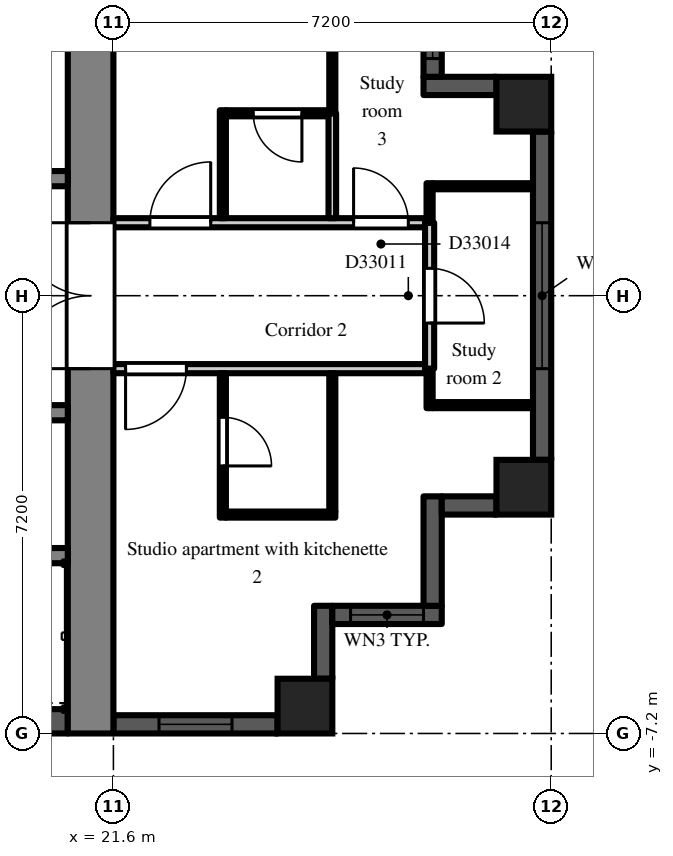
"""IFC4 building model, lengths in metres.
Left out: names, types, materials, properties, quantities, classifications, styles, units other than length and angle.
Written with IfcOpenShell. Run it as: python <this file> out.ifc"""

import sys

from ifc_helpers import new_model, si_unit, direction, frame, frame_2d, origin, origin_2d, place, context, subcontext, project, spatial, rectangle, extrude, element, fill, save


model = new_model("IFC4")
c1 = context("Model", 3, precision=1e-05, world=origin(), true_north=direction((0.0, 1.0)))
c2 = subcontext(c1, "Body", "Model", "MODEL_VIEW")
j1 = project(units=[si_unit("LENGTHUNIT", "METRE"), si_unit("PLANEANGLEUNIT", "RADIAN")], contexts=[c1])
p1 = place(None, origin())
s1 = spatial("IfcSite", under=j1, at=p1, CompositionType="ELEMENT")
p2 = place(p1, origin())
s2 = spatial("IfcBuilding", under=s1, at=p2, CompositionType="ELEMENT")
p3 = place(p2, frame((0.0, 0.0, 231.9)))
s3 = spatial("IfcBuildingStorey", under=s2, at=p3, CompositionType="ELEMENT", Elevation=231.9)
for number, where, z_axis, x_axis in (
    (1, (24.75, -6.75, 0.0), (0.0, 0.0, 1.0), (1.0, 0.0, 0.0)),
    (2, (28.35, -3.15, 0.0), (0.0, 0.0, 1.0), (1.0, 0.0, 0.0)),
    (3, (28.35, 3.15, 0.0), (0.0, 0.0, 1.0), (1.0, 0.0, 0.0)),
):
    element("IfcColumn", number, at=place(p3, frame(where, z_axis=z_axis, x_axis=x_axis)), inside=s3, PredefinedType="COLUMN", context=c2, shape_type="SweptSolid", body=[
        extrude(rectangle(XDim=0.9, YDim=0.9, at=origin_2d()), origin(), (0.0, 0.0, 1.0), 3.0),
    ])
p4 = place(p3, frame((21.6, -7.05, 0.0), z_axis=(0.0, 0.0, 1.0), x_axis=(1.0, 0.0, 0.0)))
e4 = element("IfcWall", 4, at=p4, inside=s3, PredefinedType="SOLIDWALL", context=c2, shape_type="SweptSolid", body=[
    extrude(rectangle(XDim=2.7, YDim=0.3, at=frame_2d((1.35, 0.0))), origin(), (0.0, 0.0, 1.0), 2.3),
])
p5 = place(p4, frame((0.75, 0.0, 0.2)))
e5 = element("IfcOpeningElement", 5, at=p5, cuts=e4, PredefinedType="OPENING", context=c2, shape_type="SweptSolid", body=[
    extrude(rectangle(XDim=1.2, YDim=1.85, at=frame_2d((0.6, 0.925))), frame((0.0, 0.16, 0.0), z_axis=(0.0, -1.0, 0.0), x_axis=(1.0, 0.0, 0.0)), (0.0, 0.0, 1.0), 0.32),
])
p6 = place(p3, frame((25.05, -6.3, 0.0), z_axis=(0.0, 0.0, 1.0), x_axis=(0.0, 1.0, 0.0)))
e6 = element("IfcWall", 6, at=p6, inside=s3, PredefinedType="SOLIDWALL", context=c2, shape_type="SweptSolid", body=[
    extrude(rectangle(XDim=1.2, YDim=0.3, at=frame_2d((0.6, 0.0))), origin(), (0.0, 0.0, 1.0), 2.6),
])
p7 = place(p3, frame((25.2, -5.25, 0.0), z_axis=(0.0, 0.0, 1.0), x_axis=(1.0, 0.0, 0.0)))
e7 = element("IfcWall", 7, at=p7, inside=s3, PredefinedType="SOLIDWALL", context=c2, shape_type="SweptSolid", body=[
    extrude(rectangle(XDim=1.8, YDim=0.3, at=frame_2d((0.9, 0.0))), origin(), (0.0, 0.0, 1.0), 2.6),
])
p8 = place(p7, frame((0.3, 0.0, 0.2)))
e8 = element("IfcOpeningElement", 8, at=p8, cuts=e7, PredefinedType="OPENING", context=c2, shape_type="SweptSolid", body=[
    extrude(rectangle(XDim=1.2, YDim=1.85, at=frame_2d((0.6, 0.925))), frame((0.0, 0.16, 0.0), z_axis=(0.0, -1.0, 0.0), x_axis=(1.0, 0.0, 0.0)), (0.0, 0.0, 1.0), 0.32),
])
p9 = place(p3, frame((26.85, -5.1, 0.0), z_axis=(0.0, 0.0, 1.0), x_axis=(0.0, 1.0, 0.0)))
e9 = element("IfcWall", 9, at=p9, inside=s3, PredefinedType="SOLIDWALL", context=c2, shape_type="SweptSolid", body=[
    extrude(rectangle(XDim=1.8, YDim=0.3, at=frame_2d((0.9, 0.0))), origin(), (0.0, 0.0, 1.0), 2.6),
])
p10 = place(p3, frame((27.0, -3.45, 0.0), z_axis=(0.0, 0.0, 1.0), x_axis=(1.0, 0.0, 0.0)))
e10 = element("IfcWall", 10, at=p10, inside=s3, PredefinedType="SOLIDWALL", context=c2, shape_type="SweptSolid", body=[
    extrude(rectangle(XDim=0.9, YDim=0.3, at=frame_2d((0.45, 0.0))), origin(), (0.0, 0.0, 1.0), 2.6),
])
p11 = place(p3, frame((28.65, -2.7, 0.0), z_axis=(0.0, 0.0, 1.0), x_axis=(0.0, 1.0, 0.0)))
e11 = element("IfcWall", 11, at=p11, inside=s3, PredefinedType="SOLIDWALL", context=c2, shape_type="SweptSolid", body=[
    extrude(rectangle(XDim=5.4, YDim=0.3, at=frame_2d((2.7, 0.0))), origin(), (0.0, 0.0, 1.0), 2.3),
])
p12 = place(p11, frame((1.5, 0.0, 0.2)))
e12 = element("IfcOpeningElement", 12, at=p12, cuts=e11, PredefinedType="OPENING", context=c2, shape_type="SweptSolid", body=[
    extrude(rectangle(XDim=2.4, YDim=1.85, at=frame_2d((1.2, 0.925))), frame((0.0, 0.16, 0.0), z_axis=(0.0, -1.0, 0.0), x_axis=(1.0, 0.0, 0.0)), (0.0, 0.0, 1.0), 0.32),
])
p13 = place(p3, frame((27.9, 3.45, 0.0), z_axis=(0.0, 0.0, 1.0), x_axis=(-1.0, 0.0, 0.0)))
e13 = element("IfcWall", 13, at=p13, inside=s3, PredefinedType="SOLIDWALL", context=c2, shape_type="SweptSolid", body=[
    extrude(rectangle(XDim=1.2, YDim=0.3, at=frame_2d((0.6, 0.0))), origin(), (0.0, 0.0, 1.0), 2.6),
])
p14 = place(p3, frame((26.85, 3.6, 0.0), z_axis=(0.0, 0.0, 1.0), x_axis=(0.0, 1.0, 0.0)))
e14 = element("IfcWall", 14, at=p14, inside=s3, PredefinedType="SOLIDWALL", context=c2, shape_type="SweptSolid", body=[
    extrude(rectangle(XDim=1.8, YDim=0.3, at=frame_2d((0.9, 0.0))), origin(), (0.0, 0.0, 1.0), 2.6),
])
p15 = place(p14, frame((0.3, 0.0, 0.2)))
e15 = element("IfcOpeningElement", 15, at=p15, cuts=e14, PredefinedType="OPENING", context=c2, shape_type="SweptSolid", body=[
    extrude(rectangle(XDim=1.2, YDim=1.85, at=frame_2d((0.6, 0.925))), frame((0.0, 0.16, 0.0), z_axis=(0.0, -1.0, 0.0), x_axis=(1.0, 0.0, 0.0)), (0.0, 0.0, 1.0), 0.32),
])
p16 = place(p3, frame((21.225, -7.2, 0.0), z_axis=(0.0, 0.0, 1.0), x_axis=(0.0, 1.0, 0.0)))
e16 = element("IfcWall", 16, at=p16, inside=s3, PredefinedType="SHEAR", context=c2, shape_type="SweptSolid", body=[
    extrude(rectangle(XDim=14.4, YDim=0.75, at=frame_2d((7.2, 0.0))), origin(), (0.0, 0.0, 1.0), 2.6),
])
p17 = place(p16, frame((6.0, 0.0, 0.0)))
e17 = element("IfcOpeningElement", 17, at=p17, cuts=e16, PredefinedType="OPENING", context=c2, shape_type="SweptSolid", body=[
    extrude(rectangle(XDim=2.4, YDim=2.2, at=frame_2d((1.2, 1.1))), frame((0.0, 0.385, 0.0), z_axis=(0.0, -1.0, 0.0), x_axis=(1.0, 0.0, 0.0)), (0.0, 0.0, 1.0), 0.77),
])
p18 = place(p3, frame((7.9, 1.925, 0.0), z_axis=(0.0, 0.0, 1.0), x_axis=(1.0, 0.0, 0.0)))
e18 = element("IfcWall", 18, at=p18, inside=s3, PredefinedType="SHEAR", context=c2, shape_type="SweptSolid", body=[
    extrude(rectangle(XDim=12.95, YDim=0.25, at=frame_2d((6.475, 0.0))), origin(), (0.0, 0.0, 1.0), 2.6),
])
p19 = place(p18, frame((4.825, 0.0, 0.0)))
e19 = element("IfcOpeningElement", 19, at=p19, cuts=e18, PredefinedType="OPENING", context=c2, shape_type="SweptSolid", body=[
    extrude(rectangle(XDim=1.1, YDim=2.1, at=frame_2d((0.55, 1.05))), frame((0.0, 0.135, 0.0), z_axis=(0.0, -1.0, 0.0), x_axis=(1.0, 0.0, 0.0)), (0.0, 0.0, 1.0), 0.27),
])
p20 = place(p18, frame((7.025, 0.0, 0.0)))
e20 = element("IfcOpeningElement", 20, at=p20, cuts=e18, PredefinedType="OPENING", context=c2, shape_type="SweptSolid", body=[
    extrude(rectangle(XDim=1.1, YDim=2.1, at=frame_2d((0.55, 1.05))), frame((0.0, 0.135, 0.0), z_axis=(0.0, -1.0, 0.0), x_axis=(1.0, 0.0, 0.0)), (0.0, 0.0, 1.0), 0.27),
])
p21 = place(p18, frame((9.225, 0.0, 0.0)))
e21 = element("IfcOpeningElement", 21, at=p21, cuts=e18, PredefinedType="OPENING", context=c2, shape_type="SweptSolid", body=[
    extrude(rectangle(XDim=1.1, YDim=2.1, at=frame_2d((0.55, 1.05))), frame((0.0, 0.135, 0.0), z_axis=(0.0, -1.0, 0.0), x_axis=(1.0, 0.0, 0.0)), (0.0, 0.0, 1.0), 0.27),
])
p22 = place(p18, frame((0.525, 0.0, 0.0)))
e22 = element("IfcOpeningElement", 22, at=p22, cuts=e18, PredefinedType="OPENING", context=c2, shape_type="SweptSolid", body=[
    extrude(rectangle(XDim=0.9, YDim=2.1, at=frame_2d((0.45, 1.05))), frame((0.0, 0.135, 0.0), z_axis=(0.0, -1.0, 0.0), x_axis=(1.0, 0.0, 0.0)), (0.0, 0.0, 1.0), 0.27),
])
p23 = place(p18, frame((2.625, 0.0, 0.0)))
e23 = element("IfcOpeningElement", 23, at=p23, cuts=e18, PredefinedType="OPENING", context=c2, shape_type="SweptSolid", body=[
    extrude(rectangle(XDim=1.1, YDim=2.1, at=frame_2d((0.55, 1.05))), frame((0.0, 0.135, 0.0), z_axis=(0.0, -1.0, 0.0), x_axis=(1.0, 0.0, 0.0)), (0.0, 0.0, 1.0), 0.27),
])
p24 = place(p18, frame((11.525, 0.0, 0.0)))
e24 = element("IfcOpeningElement", 24, at=p24, cuts=e18, PredefinedType="OPENING", context=c2, shape_type="SweptSolid", body=[
    extrude(rectangle(XDim=0.9, YDim=2.1, at=frame_2d((0.45, 1.05))), frame((0.0, 0.135, 0.0), z_axis=(0.0, -1.0, 0.0), x_axis=(1.0, 0.0, 0.0)), (0.0, 0.0, 1.0), 0.27),
])
p25 = place(p3, frame((7.9, -7.0, 0.0), z_axis=(0.0, 0.0, 1.0), x_axis=(1.0, 0.0, 0.0)))
e25 = element("IfcWall", 25, at=p25, inside=s3, PredefinedType="SHEAR", context=c2, shape_type="SweptSolid", body=[
    extrude(rectangle(XDim=12.95, YDim=0.4, at=frame_2d((6.475, 0.0))), origin(), (0.0, 0.0, 1.0), 2.6),
])
p26 = place(p3, frame((7.9, -1.925, 0.0), z_axis=(0.0, 0.0, 1.0), x_axis=(1.0, 0.0, 0.0)))
e26 = element("IfcWall", 26, at=p26, inside=s3, PredefinedType="SHEAR", context=c2, shape_type="SweptSolid", body=[
    extrude(rectangle(XDim=12.95, YDim=0.25, at=frame_2d((6.475, 0.0))), origin(), (0.0, 0.0, 1.0), 2.6),
])
p27 = place(p26, frame((0.525, 0.0, 0.0)))
e27 = element("IfcOpeningElement", 27, at=p27, cuts=e26, PredefinedType="OPENING", context=c2, shape_type="SweptSolid", body=[
    extrude(rectangle(XDim=0.9, YDim=2.1, at=frame_2d((0.45, 1.05))), frame((0.0, 0.135, 0.0), z_axis=(0.0, -1.0, 0.0), x_axis=(1.0, 0.0, 0.0)), (0.0, 0.0, 1.0), 0.27),
])
p28 = place(p26, frame((2.625, 0.0, 0.0)))
e28 = element("IfcOpeningElement", 28, at=p28, cuts=e26, PredefinedType="OPENING", context=c2, shape_type="SweptSolid", body=[
    extrude(rectangle(XDim=1.1, YDim=2.1, at=frame_2d((0.55, 1.05))), frame((0.0, 0.135, 0.0), z_axis=(0.0, -1.0, 0.0), x_axis=(1.0, 0.0, 0.0)), (0.0, 0.0, 1.0), 0.27),
])
p29 = place(p26, frame((4.925, 0.0, 0.0)))
e29 = element("IfcOpeningElement", 29, at=p29, cuts=e26, PredefinedType="OPENING", context=c2, shape_type="SweptSolid", body=[
    extrude(rectangle(XDim=0.9, YDim=2.1, at=frame_2d((0.45, 1.05))), frame((0.0, 0.135, 0.0), z_axis=(0.0, -1.0, 0.0), x_axis=(1.0, 0.0, 0.0)), (0.0, 0.0, 1.0), 0.27),
])
p30 = place(p26, frame((8.225, 0.0, 0.0)))
e30 = element("IfcOpeningElement", 30, at=p30, cuts=e26, PredefinedType="OPENING", context=c2, shape_type="SweptSolid", body=[
    extrude(rectangle(XDim=0.9, YDim=2.1, at=frame_2d((0.45, 1.05))), frame((0.0, 0.135, 0.0), z_axis=(0.0, -1.0, 0.0), x_axis=(1.0, 0.0, 0.0)), (0.0, 0.0, 1.0), 0.27),
])
p31 = place(p26, frame((11.525, 0.0, 0.0)))
e31 = element("IfcOpeningElement", 31, at=p31, cuts=e26, PredefinedType="OPENING", context=c2, shape_type="SweptSolid", body=[
    extrude(rectangle(XDim=0.9, YDim=2.1, at=frame_2d((0.45, 1.05))), frame((0.0, 0.135, 0.0), z_axis=(0.0, -1.0, 0.0), x_axis=(1.0, 0.0, 0.0)), (0.0, 0.0, 1.0), 0.27),
])
p32 = place(p3, frame((12.3, -4.275, 0.0), z_axis=(0.0, 0.0, 1.0), x_axis=(1.0, 0.0, 0.0)))
e32 = element("IfcWall", 32, at=p32, inside=s3, PredefinedType="SHEAR", context=c2, shape_type="SweptSolid", body=[
    extrude(rectangle(XDim=8.55, YDim=0.25, at=frame_2d((4.275, 0.0))), origin(), (0.0, 0.0, 1.0), 2.6),
])
p33 = place(p3, frame((21.6, -1.2, 0.0), z_axis=(0.0, 0.0, 1.0), x_axis=(1.0, 0.0, 0.0)))
e33 = element("IfcWall", 33, at=p33, inside=s3, PredefinedType="PARTITIONING", context=c2, shape_type="SweptSolid", body=[
    extrude(rectangle(XDim=5.125, YDim=0.15, at=frame_2d((2.562, 0.0))), origin(), (0.0, 0.0, 1.0), 2.6),
])
p34 = place(p33, frame((0.2, 0.0, 0.0)))
e34 = element("IfcOpeningElement", 34, at=p34, cuts=e33, PredefinedType="OPENING", context=c2, shape_type="SweptSolid", body=[
    extrude(rectangle(XDim=1.0, YDim=2.1, at=frame_2d((0.5, 1.05))), frame((0.0, 0.085, 0.0), z_axis=(0.0, -1.0, 0.0), x_axis=(1.0, 0.0, 0.0)), (0.0, 0.0, 1.0), 0.17),
])
p35 = place(p3, frame((21.6, 1.2, 0.0), z_axis=(0.0, 0.0, 1.0), x_axis=(1.0, 0.0, 0.0)))
e35 = element("IfcWall", 35, at=p35, inside=s3, PredefinedType="PARTITIONING", context=c2, shape_type="SweptSolid", body=[
    extrude(rectangle(XDim=5.125, YDim=0.15, at=frame_2d((2.562, 0.0))), origin(), (0.0, 0.0, 1.0), 2.6),
])
p36 = place(p35, frame((0.6, 0.0, 0.0)))
e36 = element("IfcOpeningElement", 36, at=p36, cuts=e35, PredefinedType="OPENING", context=c2, shape_type="SweptSolid", body=[
    extrude(rectangle(XDim=1.0, YDim=2.1, at=frame_2d((0.5, 1.05))), frame((0.0, 0.085, 0.0), z_axis=(0.0, -1.0, 0.0), x_axis=(1.0, 0.0, 0.0)), (0.0, 0.0, 1.0), 0.17),
])
p37 = place(p35, frame((3.95, 0.0, 0.0)))
e37 = element("IfcOpeningElement", 37, at=p37, cuts=e35, PredefinedType="OPENING", context=c2, shape_type="SweptSolid", body=[
    extrude(rectangle(XDim=0.9, YDim=2.1, at=frame_2d((0.45, 1.05))), frame((0.0, 0.085, 0.0), z_axis=(0.0, -1.0, 0.0), x_axis=(1.0, 0.0, 0.0)), (0.0, 0.0, 1.0), 0.17),
])
p38 = place(p3, frame((23.4, -3.65, 0.0), z_axis=(0.0, 0.0, 1.0), x_axis=(0.0, 1.0, 0.0)))
e38 = element("IfcWall", 38, at=p38, inside=s3, PredefinedType="PARTITIONING", context=c2, shape_type="SweptSolid", body=[
    extrude(rectangle(XDim=2.375, YDim=0.1, at=frame_2d((1.188, 0.0))), origin(), (0.0, 0.0, 1.0), 2.6),
])
p39 = place(p38, frame((0.85, 0.0, 0.0)))
e39 = element("IfcOpeningElement", 39, at=p39, cuts=e38, PredefinedType="OPENING", context=c2, shape_type="SweptSolid", body=[
    extrude(rectangle(XDim=0.8, YDim=2.1, at=frame_2d((0.4, 1.05))), frame((0.0, 0.06, 0.0), z_axis=(0.0, -1.0, 0.0), x_axis=(1.0, 0.0, 0.0)), (0.0, 0.0, 1.0), 0.12),
])
p40 = place(p3, frame((23.45, -3.6, 0.0), z_axis=(0.0, 0.0, 1.0), x_axis=(1.0, 0.0, 0.0)))
e40 = element("IfcWall", 40, at=p40, inside=s3, PredefinedType="PARTITIONING", context=c2, shape_type="SweptSolid", body=[
    extrude(rectangle(XDim=1.8, YDim=0.1, at=frame_2d((0.9, 0.0))), origin(), (0.0, 0.0, 1.0), 2.6),
])
p41 = place(p3, frame((23.4, 1.275, 0.0), z_axis=(0.0, 0.0, 1.0), x_axis=(0.0, 1.0, 0.0)))
e41 = element("IfcWall", 41, at=p41, inside=s3, PredefinedType="PARTITIONING", context=c2, shape_type="SweptSolid", body=[
    extrude(rectangle(XDim=1.775, YDim=0.1, at=frame_2d((0.888, 0.0))), origin(), (0.0, 0.0, 1.0), 2.6),
])
p42 = place(p3, frame((23.45, 3.0, 0.0), z_axis=(0.0, 0.0, 1.0), x_axis=(1.0, 0.0, 0.0)))
e42 = element("IfcWall", 42, at=p42, inside=s3, PredefinedType="PARTITIONING", context=c2, shape_type="SweptSolid", body=[
    extrude(rectangle(XDim=1.688, YDim=0.1, at=frame_2d((0.844, 0.0))), origin(), (0.0, 0.0, 1.0), 2.6),
])
p43 = place(p42, frame((0.45, 0.0, 0.0)))
e43 = element("IfcOpeningElement", 43, at=p43, cuts=e42, PredefinedType="OPENING", context=c2, shape_type="SweptSolid", body=[
    extrude(rectangle(XDim=0.8, YDim=2.1, at=frame_2d((0.4, 1.05))), frame((0.0, 0.06, 0.0), z_axis=(0.0, -1.0, 0.0), x_axis=(1.0, 0.0, 0.0)), (0.0, 0.0, 1.0), 0.12),
])
p44 = place(p3, frame((25.2, -3.55, 0.0), z_axis=(0.0, 0.0, 1.0), x_axis=(0.0, 1.0, 0.0)))
e44 = element("IfcWall", 44, at=p44, inside=s3, PredefinedType="PARTITIONING", context=c2, shape_type="SweptSolid", body=[
    extrude(rectangle(XDim=2.275, YDim=0.1, at=frame_2d((1.138, 0.0))), origin(), (0.0, 0.0, 1.0), 2.6),
])
p45 = place(p3, frame((25.2, 1.275, 0.0), z_axis=(0.0, 0.0, 1.0), x_axis=(0.0, 1.0, 0.0)))
e45 = element("IfcWall", 45, at=p45, inside=s3, PredefinedType="PARTITIONING", context=c2, shape_type="SweptSolid", body=[
    extrude(rectangle(XDim=1.725, YDim=0.125, at=frame_2d((0.863, 0.0))), origin(), (0.0, 0.0, 1.0), 2.6),
])
p46 = place(p3, frame((25.2, 3.0, 0.0), z_axis=(0.0, 0.0, 1.0), x_axis=(0.0, 1.0, 0.0)))
e46 = element("IfcWall", 46, at=p46, inside=s3, PredefinedType="PARTITIONING", context=c2, shape_type="SweptSolid", body=[
    extrude(rectangle(XDim=2.1, YDim=0.1, at=frame_2d((1.05, 0.0))), origin(), (0.0, 0.0, 1.0), 2.6),
])
p47 = place(p3, frame((26.8, -1.85, 0.0), z_axis=(0.0, 0.0, 1.0), x_axis=(0.0, 1.0, 0.0)))
e47 = element("IfcWall", 47, at=p47, inside=s3, PredefinedType="PARTITIONING", context=c2, shape_type="SweptSolid", body=[
    extrude(rectangle(XDim=0.65, YDim=0.1, at=frame_2d((0.325, 0.0))), origin(), (0.0, 0.0, 1.0), 2.6),
])
p48 = place(p3, frame((26.85, -1.8, 0.0), z_axis=(0.0, 0.0, 1.0), x_axis=(1.0, 0.0, 0.0)))
e48 = element("IfcWall", 48, at=p48, inside=s3, PredefinedType="PARTITIONING", context=c2, shape_type="SweptSolid", body=[
    extrude(rectangle(XDim=1.65, YDim=0.1, at=frame_2d((0.825, 0.0))), origin(), (0.0, 0.0, 1.0), 2.6),
])
p49 = place(p3, frame((26.8, -1.2, 0.0), z_axis=(0.0, 0.0, 1.0), x_axis=(0.0, 1.0, 0.0)))
e49 = element("IfcWall", 49, at=p49, inside=s3, PredefinedType="PARTITIONING", context=c2, shape_type="SweptSolid", body=[
    extrude(rectangle(XDim=2.4, YDim=0.15, at=frame_2d((1.2, 0.0))), origin(), (0.0, 0.0, 1.0), 2.6),
])
p50 = place(p49, frame((0.75, 0.0, 0.0)))
e50 = element("IfcOpeningElement", 50, at=p50, cuts=e49, PredefinedType="OPENING", context=c2, shape_type="SweptSolid", body=[
    extrude(rectangle(XDim=0.9, YDim=2.1, at=frame_2d((0.45, 1.05))), frame((0.0, 0.085, 0.0), z_axis=(0.0, -1.0, 0.0), x_axis=(1.0, 0.0, 0.0)), (0.0, 0.0, 1.0), 0.17),
])
p51 = place(p3, frame((26.8, 1.2, 0.0), z_axis=(0.0, 0.0, 1.0), x_axis=(0.0, 1.0, 0.0)))
e51 = element("IfcWall", 51, at=p51, inside=s3, PredefinedType="PARTITIONING", context=c2, shape_type="SweptSolid", body=[
    extrude(rectangle(XDim=0.65, YDim=0.1, at=frame_2d((0.325, 0.0))), origin(), (0.0, 0.0, 1.0), 2.6),
])
p52 = place(p3, frame((26.85, 1.8, 0.0), z_axis=(0.0, 0.0, 1.0), x_axis=(1.0, 0.0, 0.0)))
e52 = element("IfcWall", 52, at=p52, inside=s3, PredefinedType="PARTITIONING", context=c2, shape_type="SweptSolid", body=[
    extrude(rectangle(XDim=1.65, YDim=0.1, at=frame_2d((0.825, 0.0))), origin(), (0.0, 0.0, 1.0), 2.6),
])
p53 = place(p5, origin())
e53 = element("IfcWindow", 53, at=p53, inside=s3, PartitioningType="SINGLE_PANEL", PredefinedType="WINDOW", context=c2, shape_type="SweptSolid", body=[
    extrude(rectangle(XDim=1.2, YDim=1.85, at=frame_2d((0.6, 0.925))), frame((0.0, 0.03, 0.0), z_axis=(0.0, -1.0, 0.0), x_axis=(1.0, 0.0, 0.0)), (0.0, 0.0, 1.0), 0.06),
])
fill(e5, e53)
p54 = place(p8, origin())
e54 = element("IfcWindow", 54, at=p54, inside=s3, PartitioningType="SINGLE_PANEL", PredefinedType="WINDOW", context=c2, shape_type="SweptSolid", body=[
    extrude(rectangle(XDim=1.2, YDim=1.85, at=frame_2d((0.6, 0.925))), frame((0.0, 0.03, 0.0), z_axis=(0.0, -1.0, 0.0), x_axis=(1.0, 0.0, 0.0)), (0.0, 0.0, 1.0), 0.06),
])
fill(e8, e54)
p55 = place(p12, origin())
e55 = element("IfcWindow", 55, at=p55, inside=s3, PartitioningType="SINGLE_PANEL", PredefinedType="WINDOW", context=c2, shape_type="SweptSolid", body=[
    extrude(rectangle(XDim=2.4, YDim=1.85, at=frame_2d((1.2, 0.925))), frame((0.0, 0.03, 0.0), z_axis=(0.0, -1.0, 0.0), x_axis=(1.0, 0.0, 0.0)), (0.0, 0.0, 1.0), 0.06),
])
fill(e12, e55)
p56 = place(p15, origin())
e56 = element("IfcWindow", 56, at=p56, inside=s3, PartitioningType="SINGLE_PANEL", PredefinedType="WINDOW", context=c2, shape_type="SweptSolid", body=[
    extrude(rectangle(XDim=1.2, YDim=1.85, at=frame_2d((0.6, 0.925))), frame((0.0, 0.03, 0.0), z_axis=(0.0, -1.0, 0.0), x_axis=(1.0, 0.0, 0.0)), (0.0, 0.0, 1.0), 0.06),
])
fill(e15, e56)
p57 = place(p17, origin())
e57 = element("IfcDoor", 57, at=p57, inside=s3, OperationType="DOUBLE_DOOR_DOUBLE_SWING", PredefinedType="DOOR", context=c2, shape_type="SweptSolid", body=[
    extrude(rectangle(XDim=2.4, YDim=2.2, at=frame_2d((1.2, 1.1))), frame((0.0, 0.025, 0.0), z_axis=(0.0, -1.0, 0.0), x_axis=(1.0, 0.0, 0.0)), (0.0, 0.0, 1.0), 0.05),
])
fill(e17, e57)
p58 = place(p50, frame((0.9, 0.0, 0.0), z_axis=(0.0, 0.0, 1.0), x_axis=(-1.0, 0.0, 0.0)))
e58 = element("IfcDoor", 58, at=p58, inside=s3, OperationType="SINGLE_SWING_RIGHT", PredefinedType="DOOR", context=c2, shape_type="SweptSolid", body=[
    extrude(rectangle(XDim=0.9, YDim=2.1, at=frame_2d((0.45, 1.05))), frame((0.0, 0.025, 0.0), z_axis=(0.0, -1.0, 0.0), x_axis=(1.0, 0.0, 0.0)), (0.0, 0.0, 1.0), 0.05),
])
fill(e50, e58)
p59 = place(p43, frame((0.8, 0.0, 0.0), z_axis=(0.0, 0.0, 1.0), x_axis=(-1.0, 0.0, 0.0)))
e59 = element("IfcDoor", 59, at=p59, inside=s3, OperationType="SINGLE_SWING_LEFT", PredefinedType="DOOR", context=c2, shape_type="SweptSolid", body=[
    extrude(rectangle(XDim=0.8, YDim=2.1, at=frame_2d((0.4, 1.05))), frame((0.0, 0.025, 0.0), z_axis=(0.0, -1.0, 0.0), x_axis=(1.0, 0.0, 0.0)), (0.0, 0.0, 1.0), 0.05),
])
fill(e43, e59)
p60 = place(p36, origin())
e60 = element("IfcDoor", 60, at=p60, inside=s3, OperationType="SINGLE_SWING_RIGHT", PredefinedType="DOOR", context=c2, shape_type="SweptSolid", body=[
    extrude(rectangle(XDim=1.0, YDim=2.1, at=frame_2d((0.5, 1.05))), frame((0.0, 0.025, 0.0), z_axis=(0.0, -1.0, 0.0), x_axis=(1.0, 0.0, 0.0)), (0.0, 0.0, 1.0), 0.05),
])
fill(e36, e60)
p61 = place(p37, origin())
e61 = element("IfcDoor", 61, at=p61, inside=s3, OperationType="SINGLE_SWING_LEFT", PredefinedType="DOOR", context=c2, shape_type="SweptSolid", body=[
    extrude(rectangle(XDim=0.9, YDim=2.1, at=frame_2d((0.45, 1.05))), frame((0.0, 0.025, 0.0), z_axis=(0.0, -1.0, 0.0), x_axis=(1.0, 0.0, 0.0)), (0.0, 0.0, 1.0), 0.05),
])
fill(e37, e61)
p62 = place(p39, frame((0.8, 0.0, 0.0), z_axis=(0.0, 0.0, 1.0), x_axis=(-1.0, 0.0, 0.0)))
e62 = element("IfcDoor", 62, at=p62, inside=s3, OperationType="SINGLE_SWING_RIGHT", PredefinedType="DOOR", context=c2, shape_type="SweptSolid", body=[
    extrude(rectangle(XDim=0.8, YDim=2.1, at=frame_2d((0.4, 1.05))), frame((0.0, 0.025, 0.0), z_axis=(0.0, -1.0, 0.0), x_axis=(1.0, 0.0, 0.0)), (0.0, 0.0, 1.0), 0.05),
])
fill(e39, e62)
p63 = place(p34, frame((1.0, 0.0, 0.0), z_axis=(0.0, 0.0, 1.0), x_axis=(-1.0, 0.0, 0.0)))
e63 = element("IfcDoor", 63, at=p63, inside=s3, OperationType="SINGLE_SWING_RIGHT", PredefinedType="DOOR", context=c2, shape_type="SweptSolid", body=[
    extrude(rectangle(XDim=1.0, YDim=2.1, at=frame_2d((0.5, 1.05))), frame((0.0, 0.025, 0.0), z_axis=(0.0, -1.0, 0.0), x_axis=(1.0, 0.0, 0.0)), (0.0, 0.0, 1.0), 0.05),
])
fill(e34, e63)
save(model, sys.argv[1])
